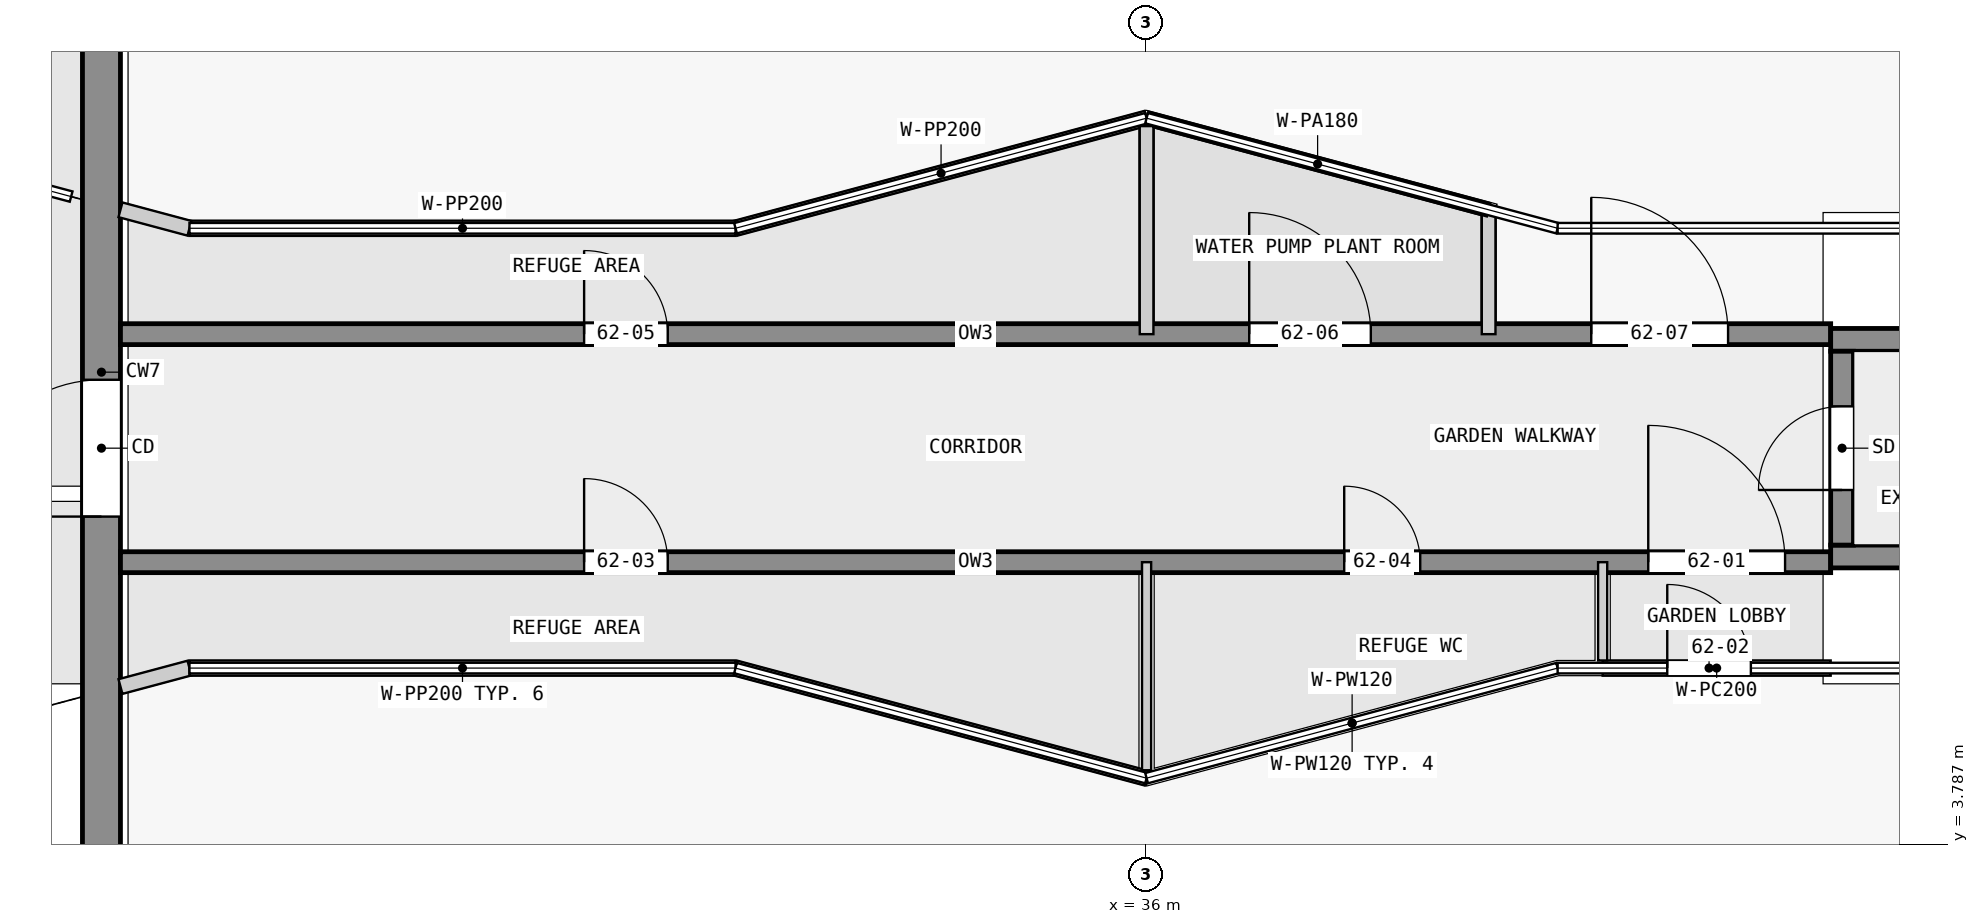
"""IFC4 building model, lengths in metres.
Left out: names, types, materials, properties, quantities, classifications, styles, units other than length and angle.
Written with IfcOpenShell. Run it as: python <this file> out.ifc"""

import sys

from ifc_helpers import new_model, si_unit, direction, frame, frame_2d, origin, place, context, subcontext, project, spatial, rectangle, extrude, element, fill, save


model = new_model("IFC4")
c1 = context("Model", 3, precision=1e-05, world=origin(), true_north=direction((0.0, 1.0)))
c2 = subcontext(c1, "Body", "Model", "MODEL_VIEW")
j1 = project(units=[si_unit("LENGTHUNIT", "METRE"), si_unit("PLANEANGLEUNIT", "RADIAN")], contexts=[c1])
p1 = place(None, origin())
s1 = spatial("IfcSite", under=j1, at=p1, CompositionType="ELEMENT")
p2 = place(p1, origin())
s2 = spatial("IfcBuilding", under=s1, at=p2, CompositionType="ELEMENT")
p3 = place(p2, frame((0.0, 0.0, 236.4)))
s3 = spatial("IfcBuildingStorey", under=s2, at=p3, CompositionType="ELEMENT", Elevation=236.4)
p4 = place(p3, frame((22.25, 2.5, 0.0), z_axis=(0.0, 0.0, 1.0), x_axis=(0.0, 1.0, 0.0)))
e1 = element("IfcWall", 1, at=p4, inside=s3, PredefinedType="SHEAR", context=c2, shape_type="SweptSolid", body=[
    extrude(rectangle(XDim=15.0, YDim=0.5, at=frame_2d((7.5, 0.0))), origin(), (0.0, 0.0, 1.0), 5.75),
])
p5 = place(p4, frame((5.6, 0.0, 0.0)))
e2 = element("IfcOpeningElement", 2, at=p5, cuts=e1, PredefinedType="OPENING", context=c2, shape_type="SweptSolid", body=[
    extrude(rectangle(XDim=1.8, YDim=2.1, at=frame_2d((0.9, 1.05))), frame((0.0, 0.26, 0.0), z_axis=(0.0, -1.0, 0.0), x_axis=(1.0, 0.0, 0.0)), (0.0, 0.0, 1.0), 0.52),
])
p6 = place(p3, frame((45.15, 7.725, 0.0), z_axis=(0.0, 0.0, 1.0), x_axis=(0.0, 1.0, 0.0)))
e3 = element("IfcWall", 3, at=p6, inside=s3, PredefinedType="SHEAR", context=c2, shape_type="SweptSolid", body=[
    extrude(rectangle(XDim=2.55, YDim=0.3, at=frame_2d((1.275, 0.0))), origin(), (0.0, 0.0, 1.0), 6.0),
])
p7 = place(p6, frame((0.725, 0.0, 0.0)))
e4 = element("IfcOpeningElement", 4, at=p7, cuts=e3, PredefinedType="OPENING", context=c2, shape_type="SweptSolid", body=[
    extrude(rectangle(XDim=1.1, YDim=2.1, at=frame_2d((0.55, 1.05))), frame((0.0, 0.16, 0.0), z_axis=(0.0, -1.0, 0.0), x_axis=(1.0, 0.0, 0.0)), (0.0, 0.0, 1.0), 0.32),
])
for number, where, z_axis, x_axis in (
    (5, (45.0, 7.575, 0.0), (0.0, 0.0, 1.0), (1.0, 0.0, 0.0)),
    (6, (45.0, 10.425, 0.0), (0.0, 0.0, 1.0), (1.0, 0.0, 0.0)),
):
    element("IfcWall", number, at=place(p3, frame(where, z_axis=z_axis, x_axis=x_axis)), inside=s3, PredefinedType="SHEAR", context=c2, shape_type="SweptSolid", body=[
        extrude(rectangle(XDim=7.2, YDim=0.3, at=frame_2d((3.6, 0.0))), origin(), (0.0, 0.0, 1.0), 6.0),
    ])
p8 = place(p3, frame((22.5, 7.5, 0.0), z_axis=(0.0, 0.0, 1.0), x_axis=(1.0, 0.0, 0.0)))
e7 = element("IfcWall", 7, at=p8, inside=s3, PredefinedType="SHEAR", context=c2, shape_type="SweptSolid", body=[
    extrude(rectangle(XDim=22.5, YDim=0.275, at=frame_2d((11.25, 0.0))), origin(), (0.0, 0.0, 1.0), 5.75),
])
p9 = place(p8, frame((20.1, 0.0, 0.0)))
e8 = element("IfcOpeningElement", 8, at=p9, cuts=e7, PredefinedType="OPENING", context=c2, shape_type="SweptSolid", body=[
    extrude(rectangle(XDim=1.8, YDim=2.1, at=frame_2d((0.9, 1.05))), frame((0.0, 0.147, 0.0), z_axis=(0.0, -1.0, 0.0), x_axis=(1.0, 0.0, 0.0)), (0.0, 0.0, 1.0), 0.295),
])
p10 = place(p8, frame((6.1, 0.0, 0.0)))
e9 = element("IfcOpeningElement", 9, at=p10, cuts=e7, PredefinedType="OPENING", context=c2, shape_type="SweptSolid", body=[
    extrude(rectangle(XDim=1.1, YDim=2.1, at=frame_2d((0.55, 1.05))), frame((0.0, 0.147, 0.0), z_axis=(0.0, -1.0, 0.0), x_axis=(1.0, 0.0, 0.0)), (0.0, 0.0, 1.0), 0.295),
])
p11 = place(p8, frame((16.1, 0.0, 0.0)))
e10 = element("IfcOpeningElement", 10, at=p11, cuts=e7, PredefinedType="OPENING", context=c2, shape_type="SweptSolid", body=[
    extrude(rectangle(XDim=1.0, YDim=2.1, at=frame_2d((0.5, 1.05))), frame((0.0, 0.147, 0.0), z_axis=(0.0, -1.0, 0.0), x_axis=(1.0, 0.0, 0.0)), (0.0, 0.0, 1.0), 0.295),
])
p12 = place(p3, frame((22.5, 10.5, 0.0), z_axis=(0.0, 0.0, 1.0), x_axis=(1.0, 0.0, 0.0)))
e11 = element("IfcWall", 11, at=p12, inside=s3, PredefinedType="SHEAR", context=c2, shape_type="SweptSolid", body=[
    extrude(rectangle(XDim=22.5, YDim=0.275, at=frame_2d((11.25, 0.0))), origin(), (0.0, 0.0, 1.0), 5.75),
])
p13 = place(p12, frame((6.1, 0.0, 0.0)))
e12 = element("IfcOpeningElement", 12, at=p13, cuts=e11, PredefinedType="OPENING", context=c2, shape_type="SweptSolid", body=[
    extrude(rectangle(XDim=1.1, YDim=2.1, at=frame_2d((0.55, 1.05))), frame((0.0, 0.147, 0.0), z_axis=(0.0, -1.0, 0.0), x_axis=(1.0, 0.0, 0.0)), (0.0, 0.0, 1.0), 0.295),
])
p14 = place(p12, frame((14.85, 0.0, 0.0)))
e13 = element("IfcOpeningElement", 13, at=p14, cuts=e11, PredefinedType="OPENING", context=c2, shape_type="SweptSolid", body=[
    extrude(rectangle(XDim=1.6, YDim=2.4, at=frame_2d((0.8, 1.2))), frame((0.0, 0.147, 0.0), z_axis=(0.0, -1.0, 0.0), x_axis=(1.0, 0.0, 0.0)), (0.0, 0.0, 1.0), 0.295),
])
p15 = place(p12, frame((19.35, 0.0, 0.0)))
e14 = element("IfcOpeningElement", 14, at=p15, cuts=e11, PredefinedType="OPENING", context=c2, shape_type="SweptSolid", body=[
    extrude(rectangle(XDim=1.8, YDim=2.1, at=frame_2d((0.9, 1.05))), frame((0.0, 0.147, 0.0), z_axis=(0.0, -1.0, 0.0), x_axis=(1.0, 0.0, 0.0)), (0.0, 0.0, 1.0), 0.295),
])
p16 = place(p3, frame((36.0, 13.341, 0.0), z_axis=(0.0, 0.0, 1.0), x_axis=(-0.96597315334, -0.258642353504, 0.0)))
e15 = element("IfcWall", 15, at=p16, inside=s3, PredefinedType="PARTITIONING", context=c2, shape_type="SweptSolid", body=[
    extrude(rectangle(XDim=5.598, YDim=0.2, at=frame_2d((2.799, 0.0))), origin(), (0.0, 0.0, 1.0), 5.75),
])
p17 = place(p3, frame((30.592, 11.893, 0.0), z_axis=(0.0, 0.0, 1.0), x_axis=(-1.0, 0.0, 0.0)))
e16 = element("IfcWall", 16, at=p17, inside=s3, PredefinedType="PARTITIONING", context=c2, shape_type="SweptSolid", body=[
    extrude(rectangle(XDim=7.184, YDim=0.2, at=frame_2d((3.592, 0.0))), origin(), (0.0, 0.0, 1.0), 5.75),
])
for number, where, z_axis, x_axis in (
    (17, (23.408, 11.893, 0.0), (0.0, 0.0, 1.0), (-0.966, 0.258, 0.0)),
    (18, (22.5, 5.864, 0.0), (0.0, 0.0, 1.0), (0.966, 0.258, 0.0)),
):
    element("IfcWall", number, at=place(p3, frame(where, z_axis=z_axis, x_axis=x_axis)), inside=s3, PredefinedType="PARTITIONING", context=c2, shape_type="SweptSolid", body=[
        extrude(rectangle(XDim=0.94, YDim=0.2, at=frame_2d((0.47, 0.0))), origin(), (0.0, 0.0, 1.0), 5.75),
    ])
p18 = place(p3, frame((23.408, 6.107, 0.0), z_axis=(0.0, 0.0, 1.0), x_axis=(1.0, 0.0, 0.0)))
e19 = element("IfcWall", 19, at=p18, inside=s3, PredefinedType="PARTITIONING", context=c2, shape_type="SweptSolid", body=[
    extrude(rectangle(XDim=7.184, YDim=0.2, at=frame_2d((3.592, 0.0))), origin(), (0.0, 0.0, 1.0), 5.75),
])
p19 = place(p3, frame((30.592, 6.107, 0.0), z_axis=(0.0, 0.0, 1.0), x_axis=(0.96597315334, -0.258642353504, 0.0)))
e20 = element("IfcWall", 20, at=p19, inside=s3, PredefinedType="PARTITIONING", context=c2, shape_type="SweptSolid", body=[
    extrude(rectangle(XDim=5.598, YDim=0.2, at=frame_2d((2.799, 0.0))), origin(), (0.0, 0.0, 1.0), 5.75),
])
p20 = place(p3, frame((40.5, 10.5, 0.0), z_axis=(0.0, 0.0, 1.0), x_axis=(0.0, 1.0, 0.0)))
e21 = element("IfcWall", 21, at=p20, inside=s3, PredefinedType="PARTITIONING", context=c2, shape_type="SweptSolid", body=[
    extrude(rectangle(XDim=1.636, YDim=0.18, at=frame_2d((0.818, 0.0))), origin(), (0.0, 0.0, 1.0), 5.75),
])
p21 = place(p3, frame((40.5, 12.136, 0.0), z_axis=(0.0, 0.0, 1.0), x_axis=(-0.965963018817, 0.258680200786, 0.0)))
e22 = element("IfcWall", 22, at=p21, inside=s3, PredefinedType="PARTITIONING", context=c2, shape_type="SweptSolid", body=[
    extrude(rectangle(XDim=4.658, YDim=0.18, at=frame_2d((2.329, 0.0))), origin(), (0.0, 0.0, 1.0), 5.75),
])
p22 = place(p3, frame((36.0, 4.659, 0.0), z_axis=(0.0, 0.0, 1.0), x_axis=(0.96597315334, 0.258642353504, 0.0)))
e23 = element("IfcWall", 23, at=p22, inside=s3, PredefinedType="PARTITIONING", context=c2, shape_type="SweptSolid", body=[
    extrude(rectangle(XDim=5.598, YDim=0.12, at=frame_2d((2.799, 0.0))), origin(), (0.0, 0.0, 1.0), 5.75),
])
p23 = place(p3, frame((41.408, 6.107, 0.0), z_axis=(0.0, 0.0, 1.0), x_axis=(1.0, 0.0, 0.0)))
e24 = element("IfcWall", 24, at=p23, inside=s3, PredefinedType="PARTITIONING", context=c2, shape_type="SweptSolid", body=[
    extrude(rectangle(XDim=0.592, YDim=0.12, at=frame_2d((0.296, 0.0))), origin(), (0.0, 0.0, 1.0), 5.75),
])
p24 = place(p3, frame((42.0, 6.107, 0.0), z_axis=(0.0, 0.0, 1.0), x_axis=(1.0, 0.0, 0.0)))
e25 = element("IfcWall", 25, at=p24, inside=s3, PredefinedType="PARTITIONING", context=c2, shape_type="SweptSolid", body=[
    extrude(rectangle(XDim=3.0, YDim=0.2, at=frame_2d((1.5, 0.0))), origin(), (0.0, 0.0, 1.0), 5.75),
])
p25 = place(p24, frame((0.85, 0.0, 0.0)))
e26 = element("IfcOpeningElement", 26, at=p25, cuts=e25, PredefinedType="OPENING", context=c2, shape_type="SweptSolid", body=[
    extrude(rectangle(XDim=1.1, YDim=2.1, at=frame_2d((0.55, 1.05))), frame((0.0, 0.11, 0.0), z_axis=(0.0, -1.0, 0.0), x_axis=(1.0, 0.0, 0.0)), (0.0, 0.0, 1.0), 0.22),
])
p26 = place(p3, frame((36.0, 13.237, 0.0), z_axis=(0.0, 0.0, 1.0), x_axis=(0.0, -1.0, 0.0)))
e27 = element("IfcWall", 27, at=p26, inside=s3, PredefinedType="PARTITIONING", context=c2, shape_type="SweptSolid", body=[
    extrude(rectangle(XDim=2.737, YDim=0.18, at=frame_2d((1.369, 0.0))), origin(), (0.0, 0.0, 1.0), 5.75),
])
p27 = place(p3, frame((36.0, 7.5, 0.0), z_axis=(0.0, 0.0, 1.0), x_axis=(0.0, -1.0, 0.0)))
e28 = element("IfcWall", 28, at=p27, inside=s3, PredefinedType="PARTITIONING", context=c2, shape_type="SweptSolid", body=[
    extrude(rectangle(XDim=2.737, YDim=0.12, at=frame_2d((1.369, 0.0))), origin(), (0.0, 0.0, 1.0), 5.75),
])
p28 = place(p3, frame((42.0, 6.207, 0.0), z_axis=(0.0, 0.0, 1.0), x_axis=(0.0, 1.0, 0.0)))
e29 = element("IfcWall", 29, at=p28, inside=s3, PredefinedType="PARTITIONING", context=c2, shape_type="SweptSolid", body=[
    extrude(rectangle(XDim=1.293, YDim=0.12, at=frame_2d((0.646, 0.0))), origin(), (0.0, 0.0, 1.0), 5.75),
])
p29 = place(p5, origin())
e30 = element("IfcDoor", 30, at=p29, inside=s3, OperationType="DOUBLE_DOOR_SINGLE_SWING", PredefinedType="DOOR", context=c2, shape_type="SweptSolid", body=[
    extrude(rectangle(XDim=1.8, YDim=2.1, at=frame_2d((0.9, 1.05))), frame((0.0, 0.025, 0.0), z_axis=(0.0, -1.0, 0.0), x_axis=(1.0, 0.0, 0.0)), (0.0, 0.0, 1.0), 0.05),
])
fill(e2, e30)
p30 = place(p7, origin())
e31 = element("IfcDoor", 31, at=p30, inside=s3, OperationType="SINGLE_SWING_LEFT", PredefinedType="DOOR", context=c2, shape_type="SweptSolid", body=[
    extrude(rectangle(XDim=1.1, YDim=2.1, at=frame_2d((0.55, 1.05))), frame((0.0, 0.025, 0.0), z_axis=(0.0, -1.0, 0.0), x_axis=(1.0, 0.0, 0.0)), (0.0, 0.0, 1.0), 0.05),
])
fill(e4, e31)
p31 = place(p9, origin())
e32 = element("IfcDoor", 32, at=p31, inside=s3, OperationType="DOUBLE_DOOR_SINGLE_SWING", PredefinedType="DOOR", context=c2, shape_type="SweptSolid", body=[
    extrude(rectangle(XDim=1.8, YDim=2.1, at=frame_2d((0.9, 1.05))), frame((0.0, 0.025, 0.0), z_axis=(0.0, -1.0, 0.0), x_axis=(1.0, 0.0, 0.0)), (0.0, 0.0, 1.0), 0.05),
])
fill(e8, e32)
p32 = place(p25, origin())
e33 = element("IfcDoor", 33, at=p32, inside=s3, OperationType="SINGLE_SWING_LEFT", PredefinedType="DOOR", context=c2, shape_type="SweptSolid", body=[
    extrude(rectangle(XDim=1.1, YDim=2.1, at=frame_2d((0.55, 1.05))), frame((0.0, 0.025, 0.0), z_axis=(0.0, -1.0, 0.0), x_axis=(1.0, 0.0, 0.0)), (0.0, 0.0, 1.0), 0.05),
])
fill(e26, e33)
p33 = place(p10, origin())
e34 = element("IfcDoor", 34, at=p33, inside=s3, OperationType="SINGLE_SWING_LEFT", PredefinedType="DOOR", context=c2, shape_type="SweptSolid", body=[
    extrude(rectangle(XDim=1.1, YDim=2.1, at=frame_2d((0.55, 1.05))), frame((0.0, 0.025, 0.0), z_axis=(0.0, -1.0, 0.0), x_axis=(1.0, 0.0, 0.0)), (0.0, 0.0, 1.0), 0.05),
])
fill(e9, e34)
p34 = place(p11, origin())
e35 = element("IfcDoor", 35, at=p34, inside=s3, OperationType="SINGLE_SWING_RIGHT", PredefinedType="DOOR", context=c2, shape_type="SweptSolid", body=[
    extrude(rectangle(XDim=1.0, YDim=2.1, at=frame_2d((0.5, 1.05))), frame((0.0, 0.025, 0.0), z_axis=(0.0, -1.0, 0.0), x_axis=(1.0, 0.0, 0.0)), (0.0, 0.0, 1.0), 0.05),
])
fill(e10, e35)
p35 = place(p13, origin())
e36 = element("IfcDoor", 36, at=p35, inside=s3, OperationType="SINGLE_SWING_LEFT", PredefinedType="DOOR", context=c2, shape_type="SweptSolid", body=[
    extrude(rectangle(XDim=1.1, YDim=2.1, at=frame_2d((0.55, 1.05))), frame((0.0, 0.025, 0.0), z_axis=(0.0, -1.0, 0.0), x_axis=(1.0, 0.0, 0.0)), (0.0, 0.0, 1.0), 0.05),
])
fill(e12, e36)
p36 = place(p14, origin())
e37 = element("IfcDoor", 37, at=p36, inside=s3, OperationType="SINGLE_SWING_RIGHT", PredefinedType="DOOR", context=c2, shape_type="SweptSolid", body=[
    extrude(rectangle(XDim=1.6, YDim=2.4, at=frame_2d((0.8, 1.2))), frame((0.0, 0.025, 0.0), z_axis=(0.0, -1.0, 0.0), x_axis=(1.0, 0.0, 0.0)), (0.0, 0.0, 1.0), 0.05),
])
fill(e13, e37)
p37 = place(p15, origin())
e38 = element("IfcDoor", 38, at=p37, inside=s3, OperationType="DOUBLE_DOOR_SINGLE_SWING", PredefinedType="DOOR", context=c2, shape_type="SweptSolid", body=[
    extrude(rectangle(XDim=1.8, YDim=2.1, at=frame_2d((0.9, 1.05))), frame((0.0, 0.025, 0.0), z_axis=(0.0, -1.0, 0.0), x_axis=(1.0, 0.0, 0.0)), (0.0, 0.0, 1.0), 0.05),
])
fill(e14, e38)
save(model, sys.argv[1])
